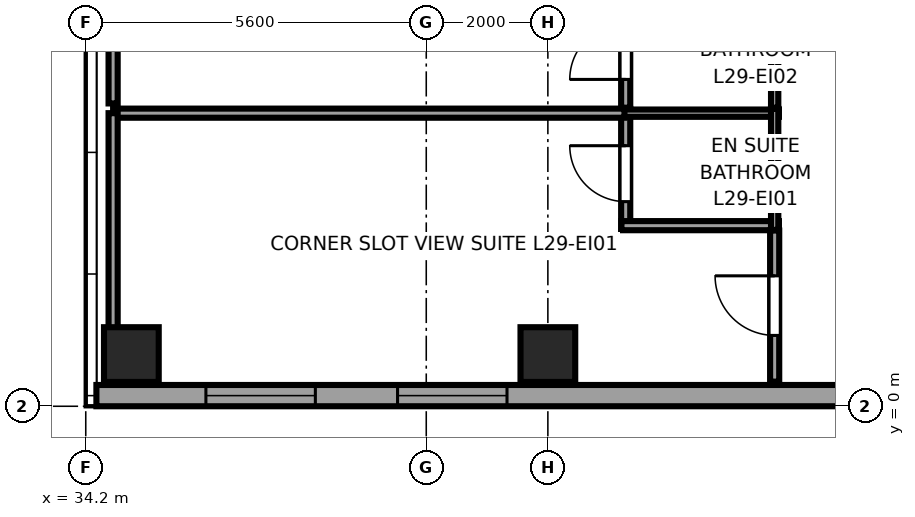
"""IFC4 building model, lengths in metres.
Left out: names, types, materials, properties, quantities, classifications, styles, units other than length and angle.
Written with IfcOpenShell. Run it as: python <this file> out.ifc"""

import sys

from ifc_helpers import new_model, si_unit, direction, frame, frame_2d, origin, origin_2d, place, context, subcontext, project, spatial, rectangle, extrude, source, transform, mapped, element, fill, save


model = new_model("IFC4")
c1 = context("Model", 3, precision=1e-05, world=origin(), true_north=direction((0.0, 1.0)))
c2 = subcontext(c1, "Body", "Model", "MODEL_VIEW")
j1 = project(units=[si_unit("LENGTHUNIT", "METRE"), si_unit("PLANEANGLEUNIT", "RADIAN")], contexts=[c1])
p1 = place(None, origin())
s1 = spatial("IfcSite", under=j1, at=p1, CompositionType="ELEMENT")
p2 = place(p1, origin())
s2 = spatial("IfcBuilding", under=s1, at=p2, CompositionType="ELEMENT")
p3 = place(p2, frame((0.0, 0.0, 115.1)))
s3 = spatial("IfcBuildingStorey", under=s2, at=p3, CompositionType="ELEMENT", Elevation=115.1)
m1 = source(origin(), c2, "Body", "SweptSolid", [
    extrude(rectangle(XDim=0.9, YDim=0.9, at=origin_2d()), origin(), (0.0, 0.0, 1.0), 3.55),
])
for number, where, z_axis, x_axis in (
    (1, (34.95, 0.85, 0.0), (0.0, 0.0, 1.0), (1.0, 0.0, 0.0)),
    (2, (41.8, 0.85, 0.0), (0.0, 0.0, 1.0), (1.0, 0.0, 0.0)),
):
    element("IfcColumn", number, at=place(p3, frame(where, z_axis=z_axis, x_axis=x_axis)), inside=s3, PredefinedType="COLUMN", context=c2, shape_type="MappedRepresentation", body=[
        mapped(m1, transform((0.0, 0.0, 0.0), x_axis=(1.0, 0.0, 0.0), y_axis=(0.0, 1.0, 0.0), z_axis=(0.0, 0.0, 1.0), scale=1.0)),
    ])
p4 = place(p3, frame((34.375, 0.175, 0.0), z_axis=(0.0, 0.0, 1.0), x_axis=(1.0, 0.0, 0.0)))
e3 = element("IfcWall", 3, at=p4, inside=s3, PredefinedType="SOLIDWALL", context=c2, shape_type="SweptSolid", body=[
    extrude(rectangle(XDim=18.008, YDim=0.35, at=frame_2d((9.004, 0.0))), origin(), (0.0, 0.0, 1.0), 3.37),
])
p5 = place(p4, frame((1.801, 0.0, 0.68)))
e4 = element("IfcOpeningElement", 4, at=p5, cuts=e3, PredefinedType="OPENING", context=c2, shape_type="SweptSolid", body=[
    extrude(rectangle(XDim=1.8, YDim=1.85, at=frame_2d((0.9, 0.925))), frame((0.0, 0.185, 0.0), z_axis=(0.0, -1.0, 0.0), x_axis=(1.0, 0.0, 0.0)), (0.0, 0.0, 1.0), 0.37),
])
p6 = place(p4, frame((4.953, 0.0, 0.68)))
e5 = element("IfcOpeningElement", 5, at=p6, cuts=e3, PredefinedType="OPENING", context=c2, shape_type="SweptSolid", body=[
    extrude(rectangle(XDim=1.8, YDim=1.85, at=frame_2d((0.9, 0.925))), frame((0.0, 0.185, 0.0), z_axis=(0.0, -1.0, 0.0), x_axis=(1.0, 0.0, 0.0)), (0.0, 0.0, 1.0), 0.37),
])
p7 = place(p3, frame((43.08, 2.9, 0.0), z_axis=(0.0, 0.0, 1.0), x_axis=(0.0, 1.0, 0.0)))
e6 = element("IfcWall", 6, at=p7, inside=s3, PredefinedType="PARTITIONING", context=c2, shape_type="SweptSolid", body=[
    extrude(rectangle(XDim=1.99, YDim=0.15, at=frame_2d((0.995, 0.0))), origin(), (0.0, 0.0, 1.0), 3.37),
])
p8 = place(p7, frame((0.465, 0.0, 0.0)))
e7 = element("IfcOpeningElement", 7, at=p8, cuts=e6, PredefinedType="OPENING", context=c2, shape_type="SweptSolid", body=[
    extrude(rectangle(XDim=0.92, YDim=2.01, at=frame_2d((0.46, 1.005))), frame((0.0, 0.085, 0.0), z_axis=(0.0, -1.0, 0.0), x_axis=(1.0, 0.0, 0.0)), (0.0, 0.0, 1.0), 0.17),
])
p9 = place(p3, frame((43.01, 2.97, 0.0), z_axis=(0.0, 0.0, 1.0), x_axis=(1.0, 0.0, 0.0)))
e8 = element("IfcWall", 8, at=p9, inside=s3, PredefinedType="PARTITIONING", context=c2, shape_type="SweptSolid", body=[
    extrude(rectangle(XDim=2.59, YDim=0.15, at=frame_2d((1.295, 0.0))), origin(), (0.0, 0.0, 1.0), 3.37),
])
p10 = place(p3, frame((43.01, 4.82, 0.0), z_axis=(0.0, 0.0, 1.0), x_axis=(1.0, 0.0, 0.0)))
e9 = element("IfcWall", 9, at=p10, inside=s3, PredefinedType="PLUMBINGWALL", context=c2, shape_type="SweptSolid", body=[
    extrude(rectangle(XDim=2.59, YDim=0.12, at=frame_2d((1.295, 0.0))), origin(), (0.0, 0.0, 1.0), 3.37),
])
p11 = place(p3, frame((45.53, 2.9, 0.0), z_axis=(0.0, 0.0, 1.0), x_axis=(0.0, 1.0, 0.0)))
e10 = element("IfcWall", 10, at=p11, inside=s3, PredefinedType="PLUMBINGWALL", context=c2, shape_type="SweptSolid", body=[
    extrude(rectangle(XDim=1.99, YDim=0.12, at=frame_2d((0.995, 0.0))), origin(), (0.0, 0.0, 1.0), 3.37),
])
p12 = place(p3, frame((43.08, 4.91, 0.0), z_axis=(0.0, 0.0, 1.0), x_axis=(0.0, 1.0, 0.0)))
e11 = element("IfcWall", 11, at=p12, inside=s3, PredefinedType="PARTITIONING", context=c2, shape_type="SweptSolid", body=[
    extrude(rectangle(XDim=1.99, YDim=0.15, at=frame_2d((0.995, 0.0))), origin(), (0.0, 0.0, 1.0), 3.37),
])
p13 = place(p12, frame((0.465, 0.0, 0.0)))
e12 = element("IfcOpeningElement", 12, at=p13, cuts=e11, PredefinedType="OPENING", context=c2, shape_type="SweptSolid", body=[
    extrude(rectangle(XDim=0.92, YDim=2.01, at=frame_2d((0.46, 1.005))), frame((0.0, 0.085, 0.0), z_axis=(0.0, -1.0, 0.0), x_axis=(1.0, 0.0, 0.0)), (0.0, 0.0, 1.0), 0.17),
])
p14 = place(p3, frame((45.53, 4.91, 0.0), z_axis=(0.0, 0.0, 1.0), x_axis=(0.0, 1.0, 0.0)))
e13 = element("IfcWall", 13, at=p14, inside=s3, PredefinedType="PLUMBINGWALL", context=c2, shape_type="SweptSolid", body=[
    extrude(rectangle(XDim=1.99, YDim=0.12, at=frame_2d((0.995, 0.0))), origin(), (0.0, 0.0, 1.0), 3.37),
])
p15 = place(p3, frame((45.53, 0.405, 0.0), z_axis=(0.0, 0.0, 1.0), x_axis=(0.0, 1.0, 0.0)))
e14 = element("IfcWall", 14, at=p15, inside=s3, PredefinedType="PARTITIONING", context=c2, shape_type="SweptSolid", body=[
    extrude(rectangle(XDim=2.485, YDim=0.15, at=frame_2d((1.242, 0.0))), origin(), (0.0, 0.0, 1.0), 3.37),
])
p16 = place(p15, frame((0.76, 0.0, 0.0)))
e15 = element("IfcOpeningElement", 15, at=p16, cuts=e14, PredefinedType="OPENING", context=c2, shape_type="SweptSolid", body=[
    extrude(rectangle(XDim=0.98, YDim=2.12, at=frame_2d((0.49, 1.06))), frame((0.0, 0.085, 0.0), z_axis=(0.0, -1.0, 0.0), x_axis=(1.0, 0.0, 0.0)), (0.0, 0.0, 1.0), 0.17),
])
p17 = place(p3, frame((34.65, 4.82, 0.0), z_axis=(0.0, 0.0, 1.0), x_axis=(1.0, 0.0, 0.0)))
e16 = element("IfcWall", 16, at=p17, inside=s3, PredefinedType="PARTITIONING", context=c2, shape_type="SweptSolid", body=[
    extrude(rectangle(XDim=8.41, YDim=0.15, at=frame_2d((4.205, 0.0))), origin(), (0.0, 0.0, 1.0), 3.37),
])
p18 = place(p3, frame((34.65, 0.405, 0.0), z_axis=(0.0, 0.0, 1.0), x_axis=(0.0, 1.0, 0.0)))
e17 = element("IfcWall", 17, at=p18, inside=s3, PredefinedType="PARTITIONING", context=c2, shape_type="SweptSolid", body=[
    extrude(rectangle(XDim=4.415, YDim=0.15, at=frame_2d((2.208, 0.0))), origin(), (0.0, 0.0, 1.0), 3.37),
])
p19 = place(p3, frame((34.65, 4.98, 0.0), z_axis=(0.0, 0.0, 1.0), x_axis=(0.0, 1.0, 0.0)))
e18 = element("IfcWall", 18, at=p19, inside=s3, PredefinedType="PARTITIONING", context=c2, shape_type="SweptSolid", body=[
    extrude(rectangle(XDim=4.74, YDim=0.15, at=frame_2d((2.37, 0.0))), origin(), (0.0, 0.0, 1.0), 3.37),
])
m2 = source(origin(), c2, "Body", "SweptSolid", [
    extrude(rectangle(XDim=1.8, YDim=1.85, at=frame_2d((0.9, 0.925))), frame((0.0, 0.09, 0.0), z_axis=(0.0, -1.0, 0.0), x_axis=(1.0, 0.0, 0.0)), (0.0, 0.0, 1.0), 0.06),
])
p20 = place(p5, origin())
e19 = element("IfcWindow", 19, at=p20, inside=s3, PartitioningType="TRIPLE_PANEL_HORIZONTAL", PredefinedType="WINDOW", context=c2, shape_type="MappedRepresentation", body=[
    mapped(m2, transform((0.0, 0.0, 0.0), x_axis=(1.0, 0.0, 0.0), y_axis=(0.0, 1.0, 0.0), z_axis=(0.0, 0.0, 1.0), scale=1.0)),
])
fill(e4, e19)
p21 = place(p6, origin())
e20 = element("IfcWindow", 20, at=p21, inside=s3, PartitioningType="TRIPLE_PANEL_HORIZONTAL", PredefinedType="WINDOW", context=c2, shape_type="MappedRepresentation", body=[
    mapped(m2, transform((0.0, 0.0, 0.0), x_axis=(1.0, 0.0, 0.0), y_axis=(0.0, 1.0, 0.0), z_axis=(0.0, 0.0, 1.0), scale=1.0)),
])
fill(e5, e20)
m3 = source(origin(), c2, "Body", "SweptSolid", [
    extrude(rectangle(XDim=0.92, YDim=2.01, at=frame_2d((0.46, 1.005))), frame((0.0, 0.025, 0.0), z_axis=(0.0, -1.0, 0.0), x_axis=(1.0, 0.0, 0.0)), (0.0, 0.0, 1.0), 0.05),
])
p22 = place(p8, origin())
e21 = element("IfcDoor", 21, at=p22, inside=s3, OperationType="SINGLE_SWING_RIGHT", PredefinedType="DOOR", context=c2, shape_type="MappedRepresentation", body=[
    mapped(m3, transform((0.0, 0.0, 0.0), x_axis=(1.0, 0.0, 0.0), y_axis=(0.0, 1.0, 0.0), z_axis=(0.0, 0.0, 1.0), scale=1.0)),
])
fill(e7, e21)
p23 = place(p13, origin())
e22 = element("IfcDoor", 22, at=p23, inside=s3, OperationType="SINGLE_SWING_LEFT", PredefinedType="DOOR", context=c2, shape_type="MappedRepresentation", body=[
    mapped(m3, transform((0.0, 0.0, 0.0), x_axis=(1.0, 0.0, 0.0), y_axis=(0.0, 1.0, 0.0), z_axis=(0.0, 0.0, 1.0), scale=1.0)),
])
fill(e12, e22)
m4 = source(origin(), c2, "Body", "SweptSolid", [
    extrude(rectangle(XDim=0.98, YDim=2.12, at=frame_2d((0.49, 1.06))), frame((0.0, 0.025, 0.0), z_axis=(0.0, -1.0, 0.0), x_axis=(1.0, 0.0, 0.0)), (0.0, 0.0, 1.0), 0.05),
])
p24 = place(p16, origin())
e23 = element("IfcDoor", 23, at=p24, inside=s3, OperationType="SINGLE_SWING_RIGHT", PredefinedType="DOOR", context=c2, shape_type="MappedRepresentation", body=[
    mapped(m4, transform((0.0, 0.0, 0.0), x_axis=(1.0, 0.0, 0.0), y_axis=(0.0, 1.0, 0.0), z_axis=(0.0, 0.0, 1.0), scale=1.0)),
])
fill(e15, e23)
save(model, sys.argv[1])
